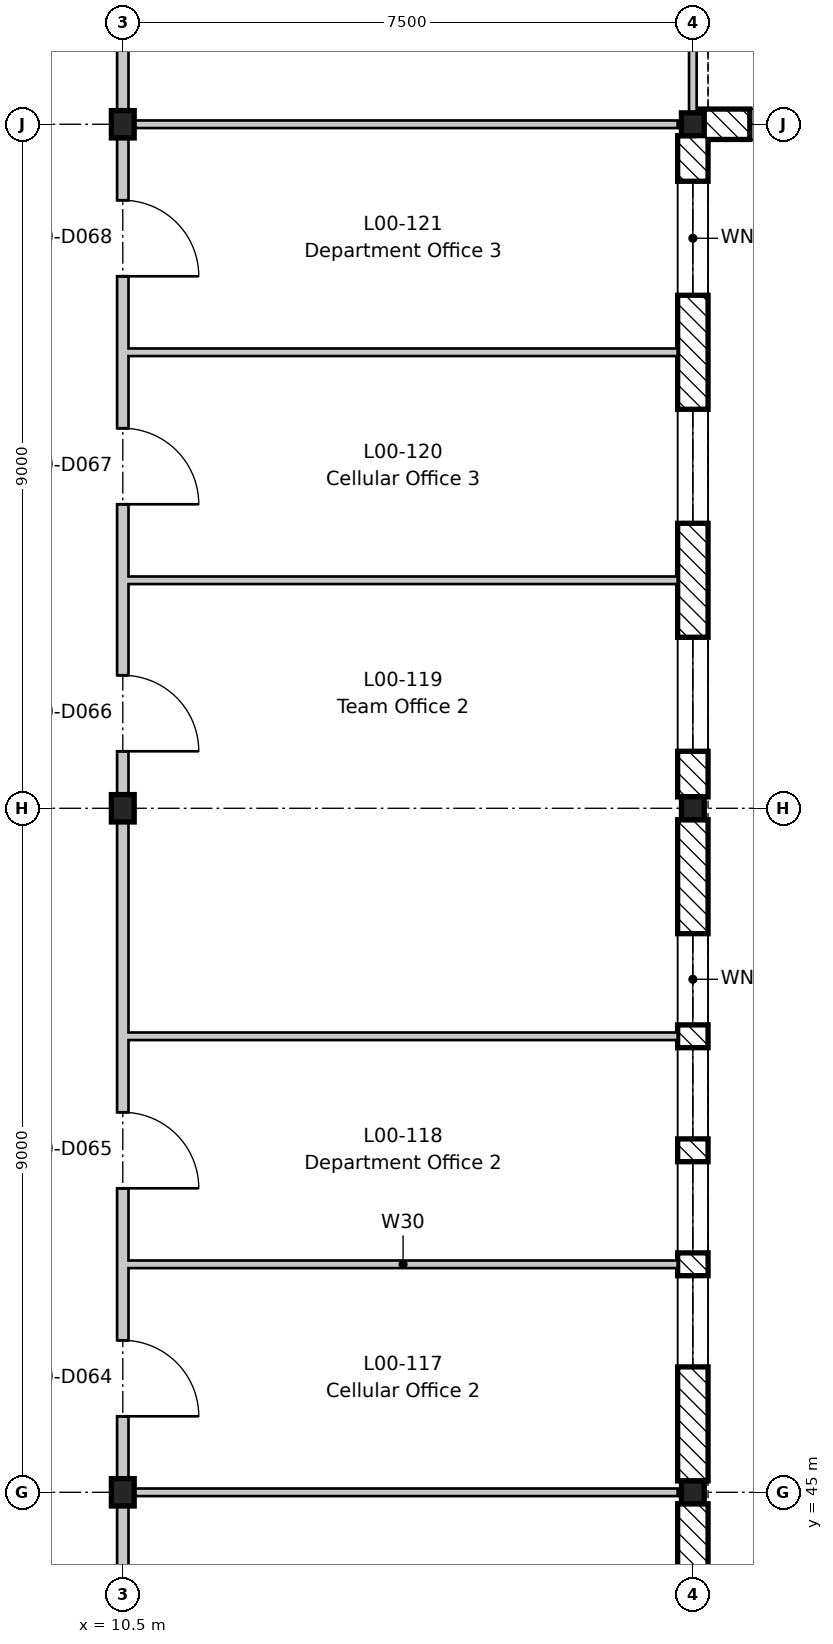
"""IFC4 building model, lengths in metres.
Left out: names, types, materials, properties, quantities, classifications, styles, units other than length and angle.
Written with IfcOpenShell. Run it as: python <this file> out.ifc"""

import sys

from ifc_helpers import new_model, si_unit, direction, frame, frame_2d, origin, origin_2d, place, context, subcontext, project, spatial, rectangle, i_section, extrude, element, fill, save


model = new_model("IFC4")
c1 = context("Model", 3, precision=1e-05, world=origin(), true_north=direction((0.0, 1.0)))
c2 = subcontext(c1, "Body", "Model", "MODEL_VIEW")
j1 = project(units=[si_unit("LENGTHUNIT", "METRE"), si_unit("PLANEANGLEUNIT", "RADIAN")], contexts=[c1])
p1 = place(None, origin())
s1 = spatial("IfcSite", under=j1, at=p1, CompositionType="ELEMENT")
p2 = place(p1, origin())
s2 = spatial("IfcBuilding", under=s1, at=p2, CompositionType="ELEMENT")
p3 = place(p2, origin())
s3 = spatial("IfcBuildingStorey", under=s2, at=p3, CompositionType="ELEMENT", Elevation=0.0)
for number, where, z_axis, x_axis in (
    (1, (10.5, 45.0, -0.6), (0.0, 0.0, 1.0), (1.0, 0.0, 0.0)),
    (2, (10.5, 54.0, -0.6), (0.0, 0.0, 1.0), (1.0, 0.0, 0.0)),
    (3, (10.5, 63.0, -0.6), (0.0, 0.0, 1.0), (1.0, 0.0, 0.0)),
):
    element("IfcColumn", number, at=place(p3, frame(where, z_axis=z_axis, x_axis=x_axis)), inside=s3, PredefinedType="COLUMN", context=c2, shape_type="SweptSolid", body=[
        extrude(i_section(OverallWidth=0.3, OverallDepth=0.36, WebThickness=0.012, FlangeThickness=0.022, FilletRadius=0.027, at=origin_2d()), origin(), (0.0, 0.0, 1.0), 5.8),
    ])
for number, where, z_axis, x_axis in (
    (4, (18.0, 45.0, -0.6), (0.0, 0.0, 1.0), (1.0, 0.0, 0.0)),
    (5, (18.0, 54.0, -0.6), (0.0, 0.0, 1.0), (1.0, 0.0, 0.0)),
    (6, (18.0, 63.0, -0.6), (0.0, 0.0, 1.0), (1.0, 0.0, 0.0)),
):
    element("IfcColumn", number, at=place(p3, frame(where, z_axis=z_axis, x_axis=x_axis)), inside=s3, PredefinedType="COLUMN", context=c2, shape_type="SweptSolid", body=[
        extrude(i_section(OverallWidth=0.3, OverallDepth=0.3, WebThickness=0.011, FlangeThickness=0.019, FilletRadius=0.027, at=origin_2d()), origin(), (0.0, 0.0, 1.0), 5.8),
    ])
p4 = place(p3, frame((18.0, 44.85, 0.0), z_axis=(0.0, 0.0, 1.0), x_axis=(0.0, -1.0, 0.0)))
e7 = element("IfcWall", 7, at=p4, inside=s3, PredefinedType="STANDARD", context=c2, shape_type="SweptSolid", body=[
    extrude(rectangle(XDim=8.7, YDim=0.4, at=frame_2d((4.35, 0.0))), origin(), (0.0, 0.0, 1.0), 4.8),
])
p5 = place(p4, frame((6.0, 0.0, 0.6)))
e8 = element("IfcOpeningElement", 8, at=p5, cuts=e7, PredefinedType="OPENING", context=c2, shape_type="SweptSolid", body=[
    extrude(rectangle(XDim=1.2, YDim=3.9, at=frame_2d((0.6, 1.95))), frame((0.0, 0.21, 0.0), z_axis=(0.0, -1.0, 0.0), x_axis=(1.0, 0.0, 0.0)), (0.0, 0.0, 1.0), 0.42),
])
p6 = place(p4, frame((4.5, 0.0, 0.6)))
e9 = element("IfcOpeningElement", 9, at=p6, cuts=e7, PredefinedType="OPENING", context=c2, shape_type="SweptSolid", body=[
    extrude(rectangle(XDim=1.2, YDim=3.9, at=frame_2d((0.6, 1.95))), frame((0.0, 0.21, 0.0), z_axis=(0.0, -1.0, 0.0), x_axis=(1.0, 0.0, 0.0)), (0.0, 0.0, 1.0), 0.42),
])
p7 = place(p4, frame((3.0, 0.0, 0.6)))
e10 = element("IfcOpeningElement", 10, at=p7, cuts=e7, PredefinedType="OPENING", context=c2, shape_type="SweptSolid", body=[
    extrude(rectangle(XDim=1.2, YDim=3.9, at=frame_2d((0.6, 1.95))), frame((0.0, 0.21, 0.0), z_axis=(0.0, -1.0, 0.0), x_axis=(1.0, 0.0, 0.0)), (0.0, 0.0, 1.0), 0.42),
])
p8 = place(p4, frame((1.5, 0.0, 0.6)))
e11 = element("IfcOpeningElement", 11, at=p8, cuts=e7, PredefinedType="OPENING", context=c2, shape_type="SweptSolid", body=[
    extrude(rectangle(XDim=1.2, YDim=3.9, at=frame_2d((0.6, 1.95))), frame((0.0, 0.21, 0.0), z_axis=(0.0, -1.0, 0.0), x_axis=(1.0, 0.0, 0.0)), (0.0, 0.0, 1.0), 0.42),
])
p9 = place(p3, frame((18.0, 53.85, 0.0), z_axis=(0.0, 0.0, 1.0), x_axis=(0.0, -1.0, 0.0)))
e12 = element("IfcWall", 12, at=p9, inside=s3, PredefinedType="STANDARD", context=c2, shape_type="SweptSolid", body=[
    extrude(rectangle(XDim=8.7, YDim=0.4, at=frame_2d((4.35, 0.0))), origin(), (0.0, 0.0, 1.0), 4.8),
])
p10 = place(p9, frame((6.0, 0.0, 0.6)))
e13 = element("IfcOpeningElement", 13, at=p10, cuts=e12, PredefinedType="OPENING", context=c2, shape_type="SweptSolid", body=[
    extrude(rectangle(XDim=1.2, YDim=3.9, at=frame_2d((0.6, 1.95))), frame((0.0, 0.21, 0.0), z_axis=(0.0, -1.0, 0.0), x_axis=(1.0, 0.0, 0.0)), (0.0, 0.0, 1.0), 0.42),
])
p11 = place(p9, frame((4.5, 0.0, 0.6)))
e14 = element("IfcOpeningElement", 14, at=p11, cuts=e12, PredefinedType="OPENING", context=c2, shape_type="SweptSolid", body=[
    extrude(rectangle(XDim=1.2, YDim=3.9, at=frame_2d((0.6, 1.95))), frame((0.0, 0.21, 0.0), z_axis=(0.0, -1.0, 0.0), x_axis=(1.0, 0.0, 0.0)), (0.0, 0.0, 1.0), 0.42),
])
p12 = place(p9, frame((3.0, 0.0, 0.6)))
e15 = element("IfcOpeningElement", 15, at=p12, cuts=e12, PredefinedType="OPENING", context=c2, shape_type="SweptSolid", body=[
    extrude(rectangle(XDim=1.2, YDim=3.9, at=frame_2d((0.6, 1.95))), frame((0.0, 0.21, 0.0), z_axis=(0.0, -1.0, 0.0), x_axis=(1.0, 0.0, 0.0)), (0.0, 0.0, 1.0), 0.42),
])
p13 = place(p9, frame((1.5, 0.0, 0.6)))
e16 = element("IfcOpeningElement", 16, at=p13, cuts=e12, PredefinedType="OPENING", context=c2, shape_type="SweptSolid", body=[
    extrude(rectangle(XDim=1.2, YDim=3.9, at=frame_2d((0.6, 1.95))), frame((0.0, 0.21, 0.0), z_axis=(0.0, -1.0, 0.0), x_axis=(1.0, 0.0, 0.0)), (0.0, 0.0, 1.0), 0.42),
])
p14 = place(p3, frame((18.0, 62.85, 0.0), z_axis=(0.0, 0.0, 1.0), x_axis=(0.0, -1.0, 0.0)))
e17 = element("IfcWall", 17, at=p14, inside=s3, PredefinedType="STANDARD", context=c2, shape_type="SweptSolid", body=[
    extrude(rectangle(XDim=8.7, YDim=0.4, at=frame_2d((4.35, 0.0))), origin(), (0.0, 0.0, 1.0), 4.8),
])
p15 = place(p14, frame((6.6, 0.0, 0.3)))
e18 = element("IfcOpeningElement", 18, at=p15, cuts=e17, PredefinedType="OPENING", context=c2, shape_type="SweptSolid", body=[
    extrude(rectangle(XDim=1.5, YDim=3.3, at=frame_2d((0.75, 1.65))), frame((0.0, 0.21, 0.0), z_axis=(0.0, -1.0, 0.0), x_axis=(1.0, 0.0, 0.0)), (0.0, 0.0, 1.0), 0.42),
])
p16 = place(p14, frame((3.6, 0.0, 0.3)))
e19 = element("IfcOpeningElement", 19, at=p16, cuts=e17, PredefinedType="OPENING", context=c2, shape_type="SweptSolid", body=[
    extrude(rectangle(XDim=1.5, YDim=3.3, at=frame_2d((0.75, 1.65))), frame((0.0, 0.21, 0.0), z_axis=(0.0, -1.0, 0.0), x_axis=(1.0, 0.0, 0.0)), (0.0, 0.0, 1.0), 0.42),
])
p17 = place(p14, frame((0.6, 0.0, 0.3)))
e20 = element("IfcOpeningElement", 20, at=p17, cuts=e17, PredefinedType="OPENING", context=c2, shape_type="SweptSolid", body=[
    extrude(rectangle(XDim=1.5, YDim=3.3, at=frame_2d((0.75, 1.65))), frame((0.0, 0.21, 0.0), z_axis=(0.0, -1.0, 0.0), x_axis=(1.0, 0.0, 0.0)), (0.0, 0.0, 1.0), 0.42),
])
p18 = place(p3, frame((26.99, 63.0, 0.0), z_axis=(0.0, 0.0, 1.0), x_axis=(-1.0, 0.0, 0.0)))
e21 = element("IfcWall", 21, at=p18, inside=s3, PredefinedType="STANDARD", context=c2, shape_type="SweptSolid", body=[
    extrude(rectangle(XDim=8.979, YDim=0.4, at=frame_2d((4.49, 0.0))), origin(), (0.0, 0.0, 1.0), 4.8),
])
p19 = place(p18, frame((6.74, 0.0, 0.3)))
e22 = element("IfcOpeningElement", 22, at=p19, cuts=e21, PredefinedType="OPENING", context=c2, shape_type="SweptSolid", body=[
    extrude(rectangle(XDim=1.5, YDim=3.3, at=frame_2d((0.75, 1.65))), frame((0.0, 0.21, 0.0), z_axis=(0.0, -1.0, 0.0), x_axis=(1.0, 0.0, 0.0)), (0.0, 0.0, 1.0), 0.42),
])
p20 = place(p18, frame((3.74, 0.0, 0.3)))
e23 = element("IfcOpeningElement", 23, at=p20, cuts=e21, PredefinedType="OPENING", context=c2, shape_type="SweptSolid", body=[
    extrude(rectangle(XDim=1.5, YDim=3.3, at=frame_2d((0.75, 1.65))), frame((0.0, 0.21, 0.0), z_axis=(0.0, -1.0, 0.0), x_axis=(1.0, 0.0, 0.0)), (0.0, 0.0, 1.0), 0.42),
])
p21 = place(p18, frame((0.74, 0.0, 0.3)))
e24 = element("IfcOpeningElement", 24, at=p21, cuts=e21, PredefinedType="OPENING", context=c2, shape_type="SweptSolid", body=[
    extrude(rectangle(XDim=1.5, YDim=3.3, at=frame_2d((0.75, 1.65))), frame((0.0, 0.21, 0.0), z_axis=(0.0, -1.0, 0.0), x_axis=(1.0, 0.0, 0.0)), (0.0, 0.0, 1.0), 0.42),
])
p22 = place(p3, frame((10.575, 45.0, 0.0), z_axis=(0.0, 0.0, 1.0), x_axis=(1.0, 0.0, 0.0)))
e25 = element("IfcWall", 25, at=p22, inside=s3, PredefinedType="PARTITIONING", context=c2, shape_type="SweptSolid", body=[
    extrude(rectangle(XDim=7.225, YDim=0.1, at=frame_2d((3.613, 0.0))), origin(), (0.0, 0.0, 1.0), 4.85),
])
for number, where, z_axis, x_axis in (
    (26, (10.575, 48.0, 0.0), (0.0, 0.0, 1.0), (1.0, 0.0, 0.0)),
    (27, (10.575, 51.0, 0.0), (0.0, 0.0, 1.0), (1.0, 0.0, 0.0)),
    (28, (10.575, 57.0, 0.0), (0.0, 0.0, 1.0), (1.0, 0.0, 0.0)),
    (29, (10.575, 60.0, 0.0), (0.0, 0.0, 1.0), (1.0, 0.0, 0.0)),
):
    element("IfcWall", number, at=place(p3, frame(where, z_axis=z_axis, x_axis=x_axis)), inside=s3, PredefinedType="PARTITIONING", context=c2, shape_type="SweptSolid", body=[
        extrude(rectangle(XDim=7.225, YDim=0.1, at=frame_2d((3.613, 0.0))), origin(), (0.0, 0.0, 1.0), 5.2),
    ])
p23 = place(p3, frame((10.575, 63.0, 0.0), z_axis=(0.0, 0.0, 1.0), x_axis=(1.0, 0.0, 0.0)))
e30 = element("IfcWall", 30, at=p23, inside=s3, PredefinedType="PARTITIONING", context=c2, shape_type="SweptSolid", body=[
    extrude(rectangle(XDim=7.225, YDim=0.1, at=frame_2d((3.613, 0.0))), origin(), (0.0, 0.0, 1.0), 4.85),
])
p24 = place(p3, frame((10.5, 0.0, 0.0), z_axis=(0.0, 0.0, 1.0), x_axis=(0.0, 1.0, 0.0)))
e31 = element("IfcWall", 31, at=p24, inside=s3, PredefinedType="PARTITIONING", context=c2, shape_type="SweptSolid", body=[
    extrude(rectangle(XDim=70.5, YDim=0.15, at=frame_2d((35.25, 0.0))), origin(), (0.0, 0.0, 1.0), 4.68),
])
p25 = place(p24, frame((1.0, 0.0, 0.0)))
e32 = element("IfcOpeningElement", 32, at=p25, cuts=e31, PredefinedType="OPENING", context=c2, shape_type="SweptSolid", body=[
    extrude(rectangle(XDim=1.0, YDim=2.1, at=frame_2d((0.5, 1.05))), frame((0.0, 0.085, 0.0), z_axis=(0.0, -1.0, 0.0), x_axis=(1.0, 0.0, 0.0)), (0.0, 0.0, 1.0), 0.17),
])
p26 = place(p24, frame((5.5, 0.0, 0.0)))
e33 = element("IfcOpeningElement", 33, at=p26, cuts=e31, PredefinedType="OPENING", context=c2, shape_type="SweptSolid", body=[
    extrude(rectangle(XDim=1.0, YDim=2.1, at=frame_2d((0.5, 1.05))), frame((0.0, 0.085, 0.0), z_axis=(0.0, -1.0, 0.0), x_axis=(1.0, 0.0, 0.0)), (0.0, 0.0, 1.0), 0.17),
])
p27 = place(p24, frame((11.5, 0.0, 0.0)))
e34 = element("IfcOpeningElement", 34, at=p27, cuts=e31, PredefinedType="OPENING", context=c2, shape_type="SweptSolid", body=[
    extrude(rectangle(XDim=1.0, YDim=2.1, at=frame_2d((0.5, 1.05))), frame((0.0, 0.085, 0.0), z_axis=(0.0, -1.0, 0.0), x_axis=(1.0, 0.0, 0.0)), (0.0, 0.0, 1.0), 0.17),
])
p28 = place(p24, frame((18.8, 0.0, 0.0)))
e35 = element("IfcOpeningElement", 35, at=p28, cuts=e31, PredefinedType="OPENING", context=c2, shape_type="SweptSolid", body=[
    extrude(rectangle(XDim=1.4, YDim=2.1, at=frame_2d((0.7, 1.05))), frame((0.0, 0.085, 0.0), z_axis=(0.0, -1.0, 0.0), x_axis=(1.0, 0.0, 0.0)), (0.0, 0.0, 1.0), 0.17),
])
p29 = place(p24, frame((25.0, 0.0, 0.0)))
e36 = element("IfcOpeningElement", 36, at=p29, cuts=e31, PredefinedType="OPENING", context=c2, shape_type="SweptSolid", body=[
    extrude(rectangle(XDim=1.0, YDim=2.1, at=frame_2d((0.5, 1.05))), frame((0.0, 0.085, 0.0), z_axis=(0.0, -1.0, 0.0), x_axis=(1.0, 0.0, 0.0)), (0.0, 0.0, 1.0), 0.17),
])
p30 = place(p24, frame((28.0, 0.0, 0.0)))
e37 = element("IfcOpeningElement", 37, at=p30, cuts=e31, PredefinedType="OPENING", context=c2, shape_type="SweptSolid", body=[
    extrude(rectangle(XDim=1.0, YDim=2.1, at=frame_2d((0.5, 1.05))), frame((0.0, 0.085, 0.0), z_axis=(0.0, -1.0, 0.0), x_axis=(1.0, 0.0, 0.0)), (0.0, 0.0, 1.0), 0.17),
])
p31 = place(p24, frame((33.8, 0.0, 0.0)))
e38 = element("IfcOpeningElement", 38, at=p31, cuts=e31, PredefinedType="OPENING", context=c2, shape_type="SweptSolid", body=[
    extrude(rectangle(XDim=1.4, YDim=2.1, at=frame_2d((0.7, 1.05))), frame((0.0, 0.085, 0.0), z_axis=(0.0, -1.0, 0.0), x_axis=(1.0, 0.0, 0.0)), (0.0, 0.0, 1.0), 0.17),
])
p32 = place(p24, frame((41.5, 0.0, 0.0)))
e39 = element("IfcOpeningElement", 39, at=p32, cuts=e31, PredefinedType="OPENING", context=c2, shape_type="SweptSolid", body=[
    extrude(rectangle(XDim=1.0, YDim=2.1, at=frame_2d((0.5, 1.05))), frame((0.0, 0.085, 0.0), z_axis=(0.0, -1.0, 0.0), x_axis=(1.0, 0.0, 0.0)), (0.0, 0.0, 1.0), 0.17),
])
p33 = place(p24, frame((46.0, 0.0, 0.0)))
e40 = element("IfcOpeningElement", 40, at=p33, cuts=e31, PredefinedType="OPENING", context=c2, shape_type="SweptSolid", body=[
    extrude(rectangle(XDim=1.0, YDim=2.1, at=frame_2d((0.5, 1.05))), frame((0.0, 0.085, 0.0), z_axis=(0.0, -1.0, 0.0), x_axis=(1.0, 0.0, 0.0)), (0.0, 0.0, 1.0), 0.17),
])
p34 = place(p24, frame((49.0, 0.0, 0.0)))
e41 = element("IfcOpeningElement", 41, at=p34, cuts=e31, PredefinedType="OPENING", context=c2, shape_type="SweptSolid", body=[
    extrude(rectangle(XDim=1.0, YDim=2.1, at=frame_2d((0.5, 1.05))), frame((0.0, 0.085, 0.0), z_axis=(0.0, -1.0, 0.0), x_axis=(1.0, 0.0, 0.0)), (0.0, 0.0, 1.0), 0.17),
])
p35 = place(p24, frame((54.75, 0.0, 0.0)))
e42 = element("IfcOpeningElement", 42, at=p35, cuts=e31, PredefinedType="OPENING", context=c2, shape_type="SweptSolid", body=[
    extrude(rectangle(XDim=1.0, YDim=2.1, at=frame_2d((0.5, 1.05))), frame((0.0, 0.085, 0.0), z_axis=(0.0, -1.0, 0.0), x_axis=(1.0, 0.0, 0.0)), (0.0, 0.0, 1.0), 0.17),
])
p36 = place(p24, frame((58.0, 0.0, 0.0)))
e43 = element("IfcOpeningElement", 43, at=p36, cuts=e31, PredefinedType="OPENING", context=c2, shape_type="SweptSolid", body=[
    extrude(rectangle(XDim=1.0, YDim=2.1, at=frame_2d((0.5, 1.05))), frame((0.0, 0.085, 0.0), z_axis=(0.0, -1.0, 0.0), x_axis=(1.0, 0.0, 0.0)), (0.0, 0.0, 1.0), 0.17),
])
p37 = place(p24, frame((61.0, 0.0, 0.0)))
e44 = element("IfcOpeningElement", 44, at=p37, cuts=e31, PredefinedType="OPENING", context=c2, shape_type="SweptSolid", body=[
    extrude(rectangle(XDim=1.0, YDim=2.1, at=frame_2d((0.5, 1.05))), frame((0.0, 0.085, 0.0), z_axis=(0.0, -1.0, 0.0), x_axis=(1.0, 0.0, 0.0)), (0.0, 0.0, 1.0), 0.17),
])
p38 = place(p24, frame((64.0, 0.0, 0.0)))
e45 = element("IfcOpeningElement", 45, at=p38, cuts=e31, PredefinedType="OPENING", context=c2, shape_type="SweptSolid", body=[
    extrude(rectangle(XDim=1.0, YDim=2.1, at=frame_2d((0.5, 1.05))), frame((0.0, 0.085, 0.0), z_axis=(0.0, -1.0, 0.0), x_axis=(1.0, 0.0, 0.0)), (0.0, 0.0, 1.0), 0.17),
])
p39 = place(p3, frame((18.0, 63.075, 0.0), z_axis=(0.0, 0.0, 1.0), x_axis=(0.0, 1.0, 0.0)))
e46 = element("IfcWall", 46, at=p39, inside=s3, PredefinedType="PARTITIONING", context=c2, shape_type="SweptSolid", body=[
    extrude(rectangle(XDim=7.35, YDim=0.1, at=frame_2d((3.675, 0.0))), origin(), (0.0, 0.0, 1.0), 4.78),
])
p40 = place(p10, origin())
e47 = element("IfcWindow", 47, at=p40, inside=s3, PartitioningType="SINGLE_PANEL", PredefinedType="WINDOW", context=c2, shape_type="SweptSolid", body=[
    extrude(rectangle(XDim=1.2, YDim=3.9, at=frame_2d((0.6, 1.95))), frame((0.0, 0.03, 0.0), z_axis=(0.0, -1.0, 0.0), x_axis=(1.0, 0.0, 0.0)), (0.0, 0.0, 1.0), 0.06),
])
fill(e13, e47)
p41 = place(p11, origin())
e48 = element("IfcWindow", 48, at=p41, inside=s3, PartitioningType="SINGLE_PANEL", PredefinedType="WINDOW", context=c2, shape_type="SweptSolid", body=[
    extrude(rectangle(XDim=1.2, YDim=3.9, at=frame_2d((0.6, 1.95))), frame((0.0, 0.03, 0.0), z_axis=(0.0, -1.0, 0.0), x_axis=(1.0, 0.0, 0.0)), (0.0, 0.0, 1.0), 0.06),
])
fill(e14, e48)
p42 = place(p12, origin())
e49 = element("IfcWindow", 49, at=p42, inside=s3, PartitioningType="SINGLE_PANEL", PredefinedType="WINDOW", context=c2, shape_type="SweptSolid", body=[
    extrude(rectangle(XDim=1.2, YDim=3.9, at=frame_2d((0.6, 1.95))), frame((0.0, 0.03, 0.0), z_axis=(0.0, -1.0, 0.0), x_axis=(1.0, 0.0, 0.0)), (0.0, 0.0, 1.0), 0.06),
])
fill(e15, e49)
p43 = place(p13, origin())
e50 = element("IfcWindow", 50, at=p43, inside=s3, PartitioningType="SINGLE_PANEL", PredefinedType="WINDOW", context=c2, shape_type="SweptSolid", body=[
    extrude(rectangle(XDim=1.2, YDim=3.9, at=frame_2d((0.6, 1.95))), frame((0.0, 0.03, 0.0), z_axis=(0.0, -1.0, 0.0), x_axis=(1.0, 0.0, 0.0)), (0.0, 0.0, 1.0), 0.06),
])
fill(e16, e50)
p44 = place(p15, origin())
e51 = element("IfcWindow", 51, at=p44, inside=s3, PartitioningType="SINGLE_PANEL", PredefinedType="WINDOW", context=c2, shape_type="SweptSolid", body=[
    extrude(rectangle(XDim=1.5, YDim=3.3, at=frame_2d((0.75, 1.65))), frame((0.0, -0.12, 0.0), z_axis=(0.0, -1.0, 0.0), x_axis=(1.0, 0.0, 0.0)), (0.0, 0.0, 1.0), 0.06),
])
fill(e18, e51)
p45 = place(p16, origin())
e52 = element("IfcWindow", 52, at=p45, inside=s3, PartitioningType="SINGLE_PANEL", PredefinedType="WINDOW", context=c2, shape_type="SweptSolid", body=[
    extrude(rectangle(XDim=1.5, YDim=3.3, at=frame_2d((0.75, 1.65))), frame((0.0, -0.12, 0.0), z_axis=(0.0, -1.0, 0.0), x_axis=(1.0, 0.0, 0.0)), (0.0, 0.0, 1.0), 0.06),
])
fill(e19, e52)
p46 = place(p17, origin())
e53 = element("IfcWindow", 53, at=p46, inside=s3, PartitioningType="SINGLE_PANEL", PredefinedType="WINDOW", context=c2, shape_type="SweptSolid", body=[
    extrude(rectangle(XDim=1.5, YDim=3.3, at=frame_2d((0.75, 1.65))), frame((0.0, -0.12, 0.0), z_axis=(0.0, -1.0, 0.0), x_axis=(1.0, 0.0, 0.0)), (0.0, 0.0, 1.0), 0.06),
])
fill(e20, e53)
p47 = place(p19, origin())
e54 = element("IfcWindow", 54, at=p47, inside=s3, PartitioningType="SINGLE_PANEL", PredefinedType="WINDOW", context=c2, shape_type="SweptSolid", body=[
    extrude(rectangle(XDim=1.5, YDim=3.3, at=frame_2d((0.75, 1.65))), frame((0.0, -0.12, 0.0), z_axis=(0.0, -1.0, 0.0), x_axis=(1.0, 0.0, 0.0)), (0.0, 0.0, 1.0), 0.06),
])
fill(e22, e54)
p48 = place(p33, frame((1.0, 0.0, 0.0), z_axis=(0.0, 0.0, 1.0), x_axis=(-1.0, 0.0, 0.0)))
e55 = element("IfcDoor", 55, at=p48, inside=s3, OperationType="SINGLE_SWING_RIGHT", PredefinedType="DOOR", context=c2, shape_type="SweptSolid", body=[
    extrude(rectangle(XDim=1.0, YDim=2.1, at=frame_2d((0.5, 1.05))), frame((0.0, 0.025, 0.0), z_axis=(0.0, -1.0, 0.0), x_axis=(1.0, 0.0, 0.0)), (0.0, 0.0, 1.0), 0.05),
])
fill(e40, e55)
p49 = place(p34, frame((1.0, 0.0, 0.0), z_axis=(0.0, 0.0, 1.0), x_axis=(-1.0, 0.0, 0.0)))
e56 = element("IfcDoor", 56, at=p49, inside=s3, OperationType="SINGLE_SWING_RIGHT", PredefinedType="DOOR", context=c2, shape_type="SweptSolid", body=[
    extrude(rectangle(XDim=1.0, YDim=2.1, at=frame_2d((0.5, 1.05))), frame((0.0, 0.025, 0.0), z_axis=(0.0, -1.0, 0.0), x_axis=(1.0, 0.0, 0.0)), (0.0, 0.0, 1.0), 0.05),
])
fill(e41, e56)
p50 = place(p35, frame((1.0, 0.0, 0.0), z_axis=(0.0, 0.0, 1.0), x_axis=(-1.0, 0.0, 0.0)))
e57 = element("IfcDoor", 57, at=p50, inside=s3, OperationType="SINGLE_SWING_RIGHT", PredefinedType="DOOR", context=c2, shape_type="SweptSolid", body=[
    extrude(rectangle(XDim=1.0, YDim=2.1, at=frame_2d((0.5, 1.05))), frame((0.0, 0.025, 0.0), z_axis=(0.0, -1.0, 0.0), x_axis=(1.0, 0.0, 0.0)), (0.0, 0.0, 1.0), 0.05),
])
fill(e42, e57)
p51 = place(p36, frame((1.0, 0.0, 0.0), z_axis=(0.0, 0.0, 1.0), x_axis=(-1.0, 0.0, 0.0)))
e58 = element("IfcDoor", 58, at=p51, inside=s3, OperationType="SINGLE_SWING_RIGHT", PredefinedType="DOOR", context=c2, shape_type="SweptSolid", body=[
    extrude(rectangle(XDim=1.0, YDim=2.1, at=frame_2d((0.5, 1.05))), frame((0.0, 0.025, 0.0), z_axis=(0.0, -1.0, 0.0), x_axis=(1.0, 0.0, 0.0)), (0.0, 0.0, 1.0), 0.05),
])
fill(e43, e58)
p52 = place(p37, frame((1.0, 0.0, 0.0), z_axis=(0.0, 0.0, 1.0), x_axis=(-1.0, 0.0, 0.0)))
e59 = element("IfcDoor", 59, at=p52, inside=s3, OperationType="SINGLE_SWING_RIGHT", PredefinedType="DOOR", context=c2, shape_type="SweptSolid", body=[
    extrude(rectangle(XDim=1.0, YDim=2.1, at=frame_2d((0.5, 1.05))), frame((0.0, 0.025, 0.0), z_axis=(0.0, -1.0, 0.0), x_axis=(1.0, 0.0, 0.0)), (0.0, 0.0, 1.0), 0.05),
])
fill(e44, e59)
save(model, sys.argv[1])
